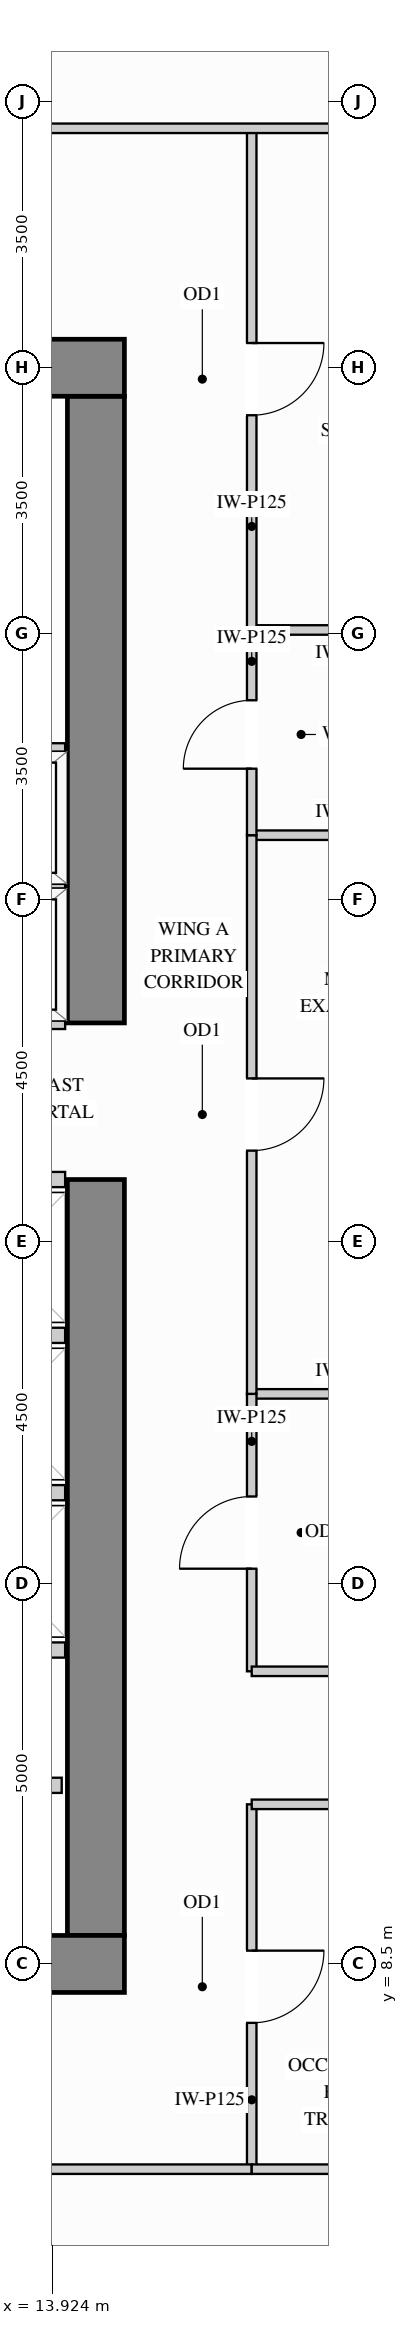
"""IFC4 building model, lengths in metres.
Left out: names, types, materials, properties, quantities, classifications, styles, units other than length and angle.
Written with IfcOpenShell. Run it as: python <this file> out.ifc"""

import sys

from ifc_helpers import new_model, si_unit, direction, frame, frame_2d, origin, place, context, subcontext, project, spatial, rectangle, extrude, source, transform, mapped, element, fill, save


model = new_model("IFC4")
c1 = context("Model", 3, precision=1e-05, world=origin(), true_north=direction((0.0, 1.0)))
c2 = subcontext(c1, "Body", "Model", "MODEL_VIEW")
j1 = project(units=[si_unit("LENGTHUNIT", "METRE"), si_unit("PLANEANGLEUNIT", "RADIAN")], contexts=[c1])
p1 = place(None, origin())
s1 = spatial("IfcSite", under=j1, at=p1, CompositionType="ELEMENT")
p2 = place(p1, origin())
s2 = spatial("IfcBuilding", under=s1, at=p2, CompositionType="ELEMENT")
p3 = place(p2, frame((0.0, 0.0, 91.8)))
s3 = spatial("IfcBuildingStorey", under=s2, at=p3, CompositionType="ELEMENT", Elevation=91.8)
m1 = source(origin(), c2, "Body", "SweptSolid", [
    extrude(rectangle(XDim=9.945, YDim=0.75, at=frame_2d((4.973, 0.0))), origin(), (0.0, 0.0, 1.0), 3.38),
])
p4 = place(p3, frame((14.5, 8.875, 0.0), z_axis=(0.0, 0.0, 1.0), x_axis=(0.0, 1.0, 0.0)))
e1 = element("IfcWall", 1, at=p4, inside=s3, PredefinedType="SHEAR", context=c2, shape_type="MappedRepresentation", body=[
    mapped(m1, transform((0.0, 0.0, 0.0), x_axis=(1.0, 0.0, 0.0), y_axis=(0.0, 1.0, 0.0), z_axis=(0.0, 0.0, 1.0))),
])
m2 = source(origin(), c2, "Body", "SweptSolid", [
    extrude(rectangle(XDim=8.245, YDim=0.75, at=frame_2d((4.123, 0.0))), origin(), (0.0, 0.0, 1.0), 3.38),
])
p5 = place(p3, frame((14.5, 20.88, 0.0), z_axis=(0.0, 0.0, 1.0), x_axis=(0.0, 1.0, 0.0)))
e2 = element("IfcWall", 2, at=p5, inside=s3, PredefinedType="SHEAR", context=c2, shape_type="MappedRepresentation", body=[
    mapped(m2, transform((0.0, 0.0, 0.0), x_axis=(1.0, 0.0, 0.0), y_axis=(0.0, 1.0, 0.0), z_axis=(0.0, 0.0, 1.0))),
])
m3 = source(origin(), c2, "Body", "SweptSolid", [
    extrude(rectangle(XDim=10.75, YDim=0.75, at=frame_2d((5.375, 0.0))), origin(), (0.0, 0.0, 1.0), 3.38),
])
for number, where, z_axis, x_axis in (
    (3, (4.125, 29.5, 0.0), (0.0, 0.0, 1.0), (1.0, 0.0, 0.0)),
    (4, (4.125, 8.5, 0.0), (0.0, 0.0, 1.0), (1.0, 0.0, 0.0)),
):
    element("IfcWall", number, at=place(p3, frame(where, z_axis=z_axis, x_axis=x_axis)), inside=s3, PredefinedType="SHEAR", context=c2, shape_type="MappedRepresentation", body=[
        mapped(m3, transform((0.0, 0.0, 0.0), x_axis=(1.0, 0.0, 0.0), y_axis=(0.0, 1.0, 0.0), z_axis=(0.0, 0.0, 1.0))),
    ])
m4 = source(origin(), c2, "Body", "SweptSolid", [
    extrude(rectangle(XDim=2.6, YDim=0.125, at=frame_2d((1.3, 0.0))), origin(), (0.0, 0.0, 1.0), 3.365),
])
p6 = place(p3, frame((16.55, 16.0, 0.0), z_axis=(0.0, 0.0, 1.0), x_axis=(1.0, 0.0, 0.0)))
e5 = element("IfcWall", 5, at=p6, inside=s3, PredefinedType="PARTITIONING", context=c2, shape_type="MappedRepresentation", body=[
    mapped(m4, transform((0.0, 0.0, 0.0), x_axis=(1.0, 0.0, 0.0), y_axis=(0.0, 1.0, 0.0), z_axis=(0.0, 0.0, 1.0))),
])
m5 = source(origin(), c2, "Body", "SweptSolid", [
    extrude(rectangle(XDim=2.598, YDim=0.125, at=frame_2d((1.299, 0.0))), origin(), (0.0, 0.0, 1.0), 3.365),
])
for number, where, z_axis, x_axis in (
    (6, (16.55, 23.35, 0.0), (0.0, 0.0, 1.0), (1.0, 0.0, 0.0)),
    (7, (16.55, 26.05, 0.0), (0.0, 0.0, 1.0), (1.0, 0.0, 0.0)),
):
    element("IfcWall", number, at=place(p3, frame(where, z_axis=z_axis, x_axis=x_axis)), inside=s3, PredefinedType="PARTITIONING", context=c2, shape_type="MappedRepresentation", body=[
        mapped(m5, transform((0.0, 0.0, 0.0), x_axis=(1.0, 0.0, 0.0), y_axis=(0.0, 1.0, 0.0), z_axis=(0.0, 0.0, 1.0))),
    ])
p7 = place(p3, frame((16.55, 12.35, 0.0), z_axis=(0.0, 0.0, 1.0), x_axis=(0.0, 1.0, 0.0)))
e8 = element("IfcWall", 8, at=p7, inside=s3, PredefinedType="PARTITIONING", context=c2, shape_type="SweptSolid", body=[
    extrude(rectangle(XDim=3.65, YDim=0.125, at=frame_2d((1.825, 0.0))), origin(), (0.0, 0.0, 1.0), 3.365),
])
p8 = place(p7, frame((1.35, 0.0, 0.0)))
e9 = element("IfcOpeningElement", 9, at=p8, cuts=e8, PredefinedType="OPENING", context=c2, shape_type="SweptSolid", body=[
    extrude(rectangle(XDim=0.95, YDim=2.15, at=frame_2d((0.475, 1.075))), frame((0.0, 0.073, 0.0), z_axis=(0.0, -1.0, 0.0), x_axis=(1.0, 0.0, 0.0)), (0.0, 0.0, 1.0), 0.145),
])
p9 = place(p3, frame((16.55, 16.0, 0.0), z_axis=(0.0, 0.0, 1.0), x_axis=(0.0, 1.0, 0.0)))
e10 = element("IfcWall", 10, at=p9, inside=s3, PredefinedType="PARTITIONING", context=c2, shape_type="SweptSolid", body=[
    extrude(rectangle(XDim=7.35, YDim=0.125, at=frame_2d((3.675, 0.0))), origin(), (0.0, 0.0, 1.0), 3.365),
])
p10 = place(p9, frame((3.2, 0.0, 0.0)))
e11 = element("IfcOpeningElement", 11, at=p10, cuts=e10, PredefinedType="OPENING", context=c2, shape_type="SweptSolid", body=[
    extrude(rectangle(XDim=0.95, YDim=2.15, at=frame_2d((0.475, 1.075))), frame((0.0, 0.073, 0.0), z_axis=(0.0, -1.0, 0.0), x_axis=(1.0, 0.0, 0.0)), (0.0, 0.0, 1.0), 0.145),
])
p11 = place(p3, frame((16.55, 26.05, 0.0), z_axis=(0.0, 0.0, 1.0), x_axis=(0.0, 1.0, 0.0)))
e12 = element("IfcWall", 12, at=p11, inside=s3, PredefinedType="PARTITIONING", context=c2, shape_type="SweptSolid", body=[
    extrude(rectangle(XDim=6.6, YDim=0.125, at=frame_2d((3.3, 0.0))), origin(), (0.0, 0.0, 1.0), 3.365),
])
p12 = place(p11, frame((2.825, 0.0, 0.0)))
e13 = element("IfcOpeningElement", 13, at=p12, cuts=e12, PredefinedType="OPENING", context=c2, shape_type="SweptSolid", body=[
    extrude(rectangle(XDim=0.95, YDim=2.15, at=frame_2d((0.475, 1.075))), frame((0.0, 0.073, 0.0), z_axis=(0.0, -1.0, 0.0), x_axis=(1.0, 0.0, 0.0)), (0.0, 0.0, 1.0), 0.145),
])
p13 = place(p3, frame((16.55, 5.8, 0.0), z_axis=(0.0, 0.0, 1.0), x_axis=(0.0, 1.0, 0.0)))
e14 = element("IfcWall", 14, at=p13, inside=s3, PredefinedType="PARTITIONING", context=c2, shape_type="SweptSolid", body=[
    extrude(rectangle(XDim=4.8, YDim=0.125, at=frame_2d((2.4, 0.0))), origin(), (0.0, 0.0, 1.0), 3.365),
])
p14 = place(p13, frame((1.925, 0.0, 0.0)))
e15 = element("IfcOpeningElement", 15, at=p14, cuts=e14, PredefinedType="OPENING", context=c2, shape_type="SweptSolid", body=[
    extrude(rectangle(XDim=0.95, YDim=2.15, at=frame_2d((0.475, 1.075))), frame((0.0, 0.073, 0.0), z_axis=(0.0, -1.0, 0.0), x_axis=(1.0, 0.0, 0.0)), (0.0, 0.0, 1.0), 0.145),
])
p15 = place(p3, frame((16.55, 23.35, 0.0), z_axis=(0.0, 0.0, 1.0), x_axis=(0.0, 1.0, 0.0)))
e16 = element("IfcWall", 16, at=p15, inside=s3, PredefinedType="PARTITIONING", context=c2, shape_type="SweptSolid", body=[
    extrude(rectangle(XDim=2.7, YDim=0.125, at=frame_2d((1.35, 0.0))), origin(), (0.0, 0.0, 1.0), 3.365),
])
p16 = place(p15, frame((0.875, 0.0, 0.0)))
e17 = element("IfcOpeningElement", 17, at=p16, cuts=e16, PredefinedType="OPENING", context=c2, shape_type="SweptSolid", body=[
    extrude(rectangle(XDim=0.9, YDim=2.15, at=frame_2d((0.45, 1.075))), frame((0.0, 0.073, 0.0), z_axis=(0.0, -1.0, 0.0), x_axis=(1.0, 0.0, 0.0)), (0.0, 0.0, 1.0), 0.145),
])
m6 = source(origin(), c2, "Body", "SweptSolid", [
    extrude(rectangle(XDim=5.798, YDim=0.125, at=frame_2d((2.899, 0.0))), origin(), (0.0, 0.0, 1.0), 3.365),
])
p17 = place(p3, frame((13.35, 32.65, 0.0), z_axis=(0.0, 0.0, 1.0), x_axis=(1.0, 0.0, 0.0)))
e18 = element("IfcWall", 18, at=p17, inside=s3, PredefinedType="PARTITIONING", context=c2, shape_type="MappedRepresentation", body=[
    mapped(m6, transform((0.0, 0.0, 0.0), x_axis=(1.0, 0.0, 0.0), y_axis=(0.0, 1.0, 0.0), z_axis=(0.0, 0.0, 1.0))),
])
m7 = source(origin(), c2, "Body", "SweptSolid", [
    extrude(rectangle(XDim=2.95, YDim=0.125, at=frame_2d((1.475, 0.0))), origin(), (0.0, 0.0, 1.0), 3.365),
])
for number, where, z_axis, x_axis in (
    (19, (16.55, 12.35, 0.0), (0.0, 0.0, 1.0), (1.0, 0.0, 0.0)),
    (20, (16.55, 10.6, 0.0), (0.0, 0.0, 1.0), (1.0, 0.0, 0.0)),
):
    element("IfcWall", number, at=place(p3, frame(where, z_axis=z_axis, x_axis=x_axis)), inside=s3, PredefinedType="PARTITIONING", context=c2, shape_type="MappedRepresentation", body=[
        mapped(m7, transform((0.0, 0.0, 0.0), x_axis=(1.0, 0.0, 0.0), y_axis=(0.0, 1.0, 0.0), z_axis=(0.0, 0.0, 1.0))),
    ])
p18 = place(p3, frame((9.882, 5.8, 0.0), z_axis=(0.0, 0.0, 1.0), x_axis=(1.0, 0.0, 0.0)))
e21 = element("IfcWall", 21, at=p18, inside=s3, PredefinedType="PARTITIONING", context=c2, shape_type="SweptSolid", body=[
    extrude(rectangle(XDim=6.668, YDim=0.125, at=frame_2d((3.334, 0.0))), origin(), (0.0, 0.0, 1.0), 3.365),
])
p19 = place(p18, frame((2.859, 0.0, 0.0)))
e22 = element("IfcOpeningElement", 22, at=p19, cuts=e21, PredefinedType="OPENING", context=c2, shape_type="SweptSolid", body=[
    extrude(rectangle(XDim=0.95, YDim=2.15, at=frame_2d((0.475, 1.075))), frame((0.0, 0.073, 0.0), z_axis=(0.0, -1.0, 0.0), x_axis=(1.0, 0.0, 0.0)), (0.0, 0.0, 1.0), 0.145),
])
p20 = place(p3, frame((16.55, 5.8, 0.0), z_axis=(0.0, 0.0, 1.0), x_axis=(1.0, 0.0, 0.0)))
e23 = element("IfcWall", 23, at=p20, inside=s3, PredefinedType="PARTITIONING", context=c2, shape_type="MappedRepresentation", body=[
    mapped(m5, transform((0.0, 0.0, 0.0), x_axis=(1.0, 0.0, 0.0), y_axis=(0.0, 1.0, 0.0), z_axis=(0.0, 0.0, 1.0))),
])
m8 = source(origin(), c2, "Body", "SweptSolid", [
    extrude(rectangle(XDim=1.63, YDim=0.2, at=frame_2d((0.815, 0.0))), origin(), (0.0, 0.0, 1.0), 3.365),
])
p21 = place(p3, frame((12.42, 10.85, 0.0), z_axis=(0.0, 0.0, 1.0), x_axis=(1.0, 0.0, 0.0)))
e24 = element("IfcWall", 24, at=p21, inside=s3, PredefinedType="PARTITIONING", context=c2, shape_type="MappedRepresentation", body=[
    mapped(m8, transform((0.0, 0.0, 0.0), x_axis=(1.0, 0.0, 0.0), y_axis=(0.0, 1.0, 0.0), z_axis=(0.0, 0.0, 1.0))),
])
m9 = source(origin(), c2, "Body", "SweptSolid", [
    extrude(rectangle(XDim=2.265, YDim=0.2, at=frame_2d((1.132, 0.0))), origin(), (0.0, 0.0, 1.0), 3.365),
])
for number, where, z_axis, x_axis in (
    (25, (11.83, 22.66, 0.0), (0.0, 0.0, 1.0), (1.0, 0.0, 0.0)),
    (26, (11.83, 20.9, 0.0), (0.0, 0.0, 1.0), (1.0, 0.0, 0.0)),
    (27, (11.83, 24.46, 0.0), (0.0, 0.0, 1.0), (1.0, 0.0, 0.0)),
):
    element("IfcWall", number, at=place(p3, frame(where, z_axis=z_axis, x_axis=x_axis)), inside=s3, PredefinedType="PARTITIONING", context=c2, shape_type="MappedRepresentation", body=[
        mapped(m9, transform((0.0, 0.0, 0.0), x_axis=(1.0, 0.0, 0.0), y_axis=(0.0, 1.0, 0.0), z_axis=(0.0, 0.0, 1.0))),
    ])
m10 = source(origin(), c2, "Body", "SweptSolid", [
    extrude(rectangle(XDim=1.865, YDim=0.2, at=frame_2d((0.933, 0.0))), origin(), (0.0, 0.0, 1.0), 3.365),
])
for number, where, z_axis, x_axis in (
    (28, (12.23, 14.7, 0.0), (0.0, 0.0, 1.0), (1.0, 0.0, 0.0)),
    (29, (12.23, 12.63, 0.0), (0.0, 0.0, 1.0), (1.0, 0.0, 0.0)),
    (30, (12.23, 16.77, 0.0), (0.0, 0.0, 1.0), (1.0, 0.0, 0.0)),
    (31, (12.23, 18.82, 0.0), (0.0, 0.0, 1.0), (1.0, 0.0, 0.0)),
):
    element("IfcWall", number, at=place(p3, frame(where, z_axis=z_axis, x_axis=x_axis)), inside=s3, PredefinedType="PARTITIONING", context=c2, shape_type="MappedRepresentation", body=[
        mapped(m10, transform((0.0, 0.0, 0.0), x_axis=(1.0, 0.0, 0.0), y_axis=(0.0, 1.0, 0.0), z_axis=(0.0, 0.0, 1.0))),
    ])
m11 = source(origin(), c2, "Body", "SweptSolid", [
    extrude(rectangle(XDim=0.95, YDim=2.15, at=frame_2d((0.475, 1.075))), frame((0.0, 0.025, 0.0), z_axis=(0.0, -1.0, 0.0), x_axis=(1.0, 0.0, 0.0)), (0.0, 0.0, 1.0), 0.05),
])
p22 = place(p14, origin())
e32 = element("IfcDoor", 32, at=p22, inside=s3, OperationType="SINGLE_SWING_RIGHT", PredefinedType="DOOR", context=c2, shape_type="MappedRepresentation", body=[
    mapped(m11, transform((0.0, 0.0, 0.0), x_axis=(1.0, 0.0, 0.0), y_axis=(0.0, 1.0, 0.0), z_axis=(0.0, 0.0, 1.0))),
])
fill(e15, e32)
p23 = place(p8, origin())
e33 = element("IfcDoor", 33, at=p23, inside=s3, OperationType="SINGLE_SWING_LEFT", PredefinedType="DOOR", context=c2, shape_type="MappedRepresentation", body=[
    mapped(m11, transform((0.0, 0.0, 0.0), x_axis=(1.0, 0.0, 0.0), y_axis=(0.0, 1.0, 0.0), z_axis=(0.0, 0.0, 1.0))),
])
fill(e9, e33)
p24 = place(p10, origin())
e34 = element("IfcDoor", 34, at=p24, inside=s3, OperationType="SINGLE_SWING_RIGHT", PredefinedType="DOOR", context=c2, shape_type="MappedRepresentation", body=[
    mapped(m11, transform((0.0, 0.0, 0.0), x_axis=(1.0, 0.0, 0.0), y_axis=(0.0, 1.0, 0.0), z_axis=(0.0, 0.0, 1.0))),
])
fill(e11, e34)
p25 = place(p12, origin())
e35 = element("IfcDoor", 35, at=p25, inside=s3, OperationType="SINGLE_SWING_RIGHT", PredefinedType="DOOR", context=c2, shape_type="MappedRepresentation", body=[
    mapped(m11, transform((0.0, 0.0, 0.0), x_axis=(1.0, 0.0, 0.0), y_axis=(0.0, 1.0, 0.0), z_axis=(0.0, 0.0, 1.0))),
])
fill(e13, e35)
m12 = source(origin(), c2, "Body", "SweptSolid", [
    extrude(rectangle(XDim=0.9, YDim=2.15, at=frame_2d((0.45, 1.075))), frame((0.0, 0.025, 0.0), z_axis=(0.0, -1.0, 0.0), x_axis=(1.0, 0.0, 0.0)), (0.0, 0.0, 1.0), 0.05),
])
p26 = place(p16, origin())
e36 = element("IfcDoor", 36, at=p26, inside=s3, OperationType="SINGLE_SWING_LEFT", PredefinedType="DOOR", context=c2, shape_type="MappedRepresentation", body=[
    mapped(m12, transform((0.0, 0.0, 0.0), x_axis=(1.0, 0.0, 0.0), y_axis=(0.0, 1.0, 0.0), z_axis=(0.0, 0.0, 1.0))),
])
fill(e17, e36)
save(model, sys.argv[1])
